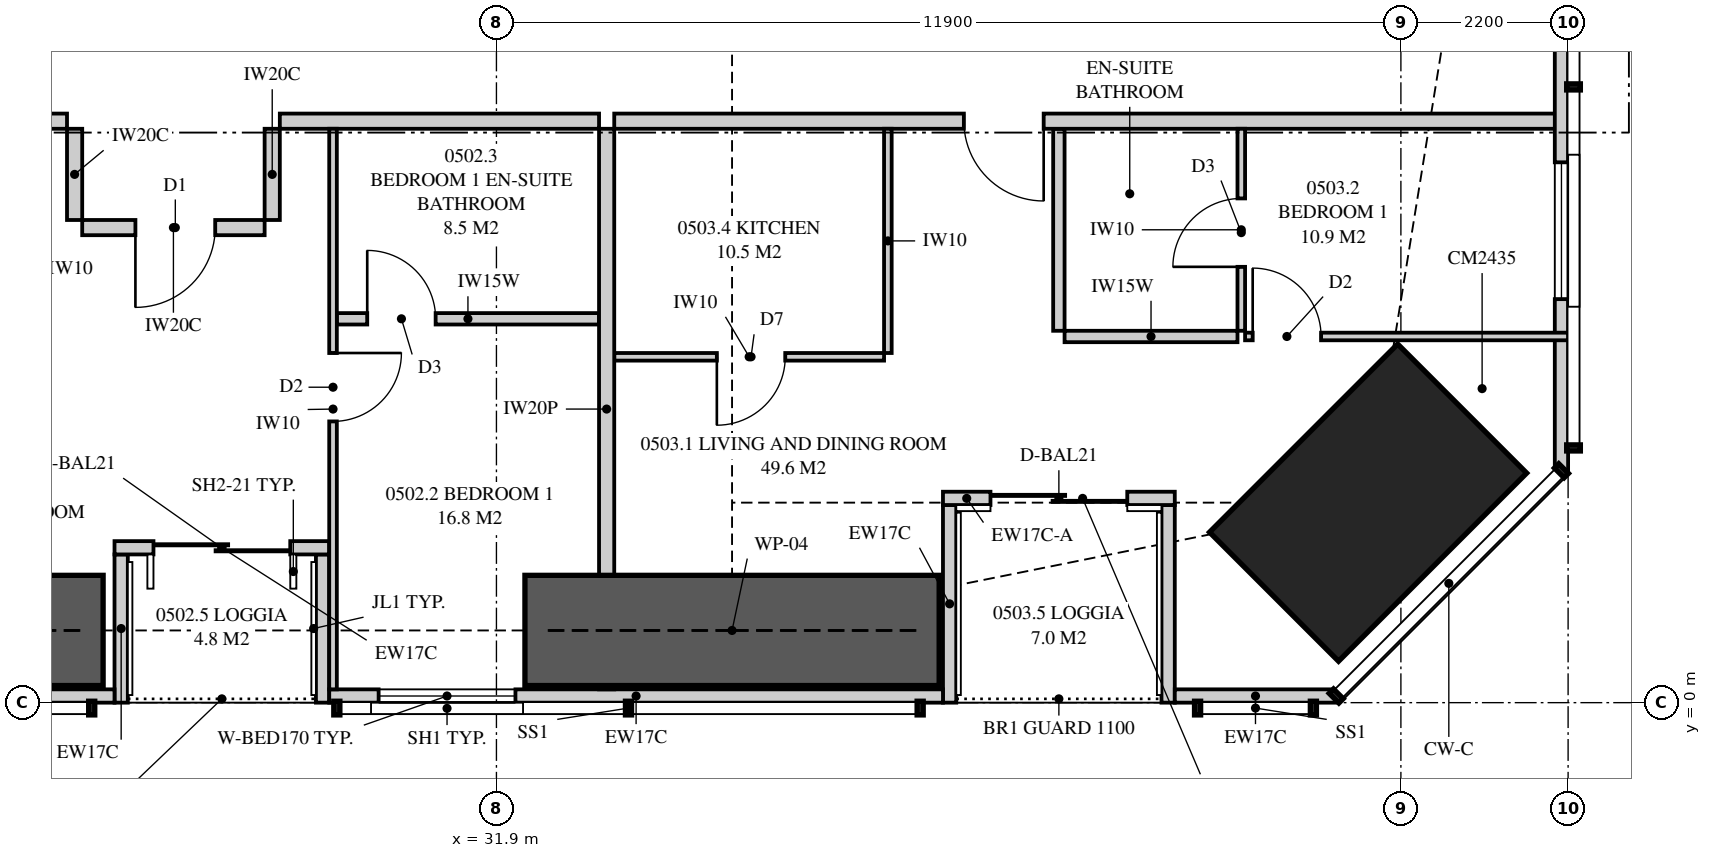
"""IFC4 building model, lengths in metres.
Left out: names, types, materials, properties, quantities, classifications, styles, units other than length and angle.
Written with IfcOpenShell. Run it as: python <this file> out.ifc"""

import sys

from ifc_helpers import new_model, si_unit, direction, frame, frame_2d, origin, origin_2d, place, context, subcontext, project, spatial, polyline, rectangle, outline, extrude, element, fill, save


model = new_model("IFC4")
c1 = context("Model", 3, precision=1e-05, world=origin(), true_north=direction((0.0, 1.0)))
c2 = subcontext(c1, "Body", "Model", "MODEL_VIEW")
j1 = project(units=[si_unit("LENGTHUNIT", "METRE"), si_unit("PLANEANGLEUNIT", "RADIAN")], contexts=[c1])
p1 = place(None, origin())
s1 = spatial("IfcSite", under=j1, at=p1, CompositionType="ELEMENT")
p2 = place(p1, origin())
s2 = spatial("IfcBuilding", under=s1, at=p2, CompositionType="ELEMENT")
p3 = place(p2, frame((0.0, 0.0, 24.35)))
s3 = spatial("IfcBuildingStorey", under=s2, at=p3, CompositionType="ELEMENT", Elevation=24.35)
p4 = place(p3, frame((43.369, 2.631, 0.0), z_axis=(0.0, 0.0, 1.0), x_axis=(-0.707106781187, 0.707106781187, 0.0)))
e1 = element("IfcColumn", 1, at=p4, inside=s3, PredefinedType="COLUMN", context=c2, shape_type="SweptSolid", body=[
    extrude(rectangle(XDim=2.4, YDim=3.5, at=origin_2d()), origin(), (0.0, 0.0, 1.0), 3.35),
])
p5 = place(p3, frame((19.025, 0.087, 0.0), z_axis=(0.0, 0.0, 1.0), x_axis=(1.0, 0.0, 0.0)))
e2 = element("IfcWall", 2, at=p5, inside=s3, PredefinedType="SOLIDWALL", context=c2, shape_type="SweptSolid", body=[
    extrude(rectangle(XDim=7.85, YDim=0.175, at=frame_2d((3.925, 0.0))), origin(), (0.0, 0.0, 1.0), 2.15),
])
p6 = place(p3, frame((29.7, 0.087, 0.0), z_axis=(0.0, 0.0, 1.0), x_axis=(1.0, 0.0, 0.0)))
e3 = element("IfcWall", 3, at=p6, inside=s3, PredefinedType="SOLIDWALL", context=c2, shape_type="SweptSolid", body=[
    extrude(outline(polyline([(0.0, 0.0), (8.075, 0.0), (8.075, 3.11), (5.504, 3.11), (5.504, 2.15), (5.456, 2.15), (5.456, 3.11), (5.3, 3.11), (5.3, 2.15), (0.0, 2.15), (0.0, 0.0)])), frame((0.0, 0.087, 0.0), z_axis=(0.0, -1.0, 0.0), x_axis=(1.0, 0.0, 0.0)), (0.0, 0.0, 1.0), 0.175),
])
p7 = place(p6, frame((0.65, 0.0, 0.4)))
e4 = element("IfcOpeningElement", 4, at=p7, cuts=e3, PredefinedType="OPENING", context=c2, shape_type="SweptSolid", body=[
    extrude(rectangle(XDim=1.8, YDim=1.7, at=frame_2d((0.9, 0.85))), frame((0.0, 0.097, 0.0), z_axis=(0.0, -1.0, 0.0), x_axis=(1.0, 0.0, 0.0)), (0.0, 0.0, 1.0), 0.195),
])
p8 = place(p3, frame((40.825, 0.087, 0.0), z_axis=(0.0, 0.0, 1.0), x_axis=(1.0, 0.0, 0.0)))
e5 = element("IfcWall", 5, at=p8, inside=s3, PredefinedType="SOLIDWALL", context=c2, shape_type="SweptSolid", body=[
    extrude(rectangle(XDim=2.124, YDim=0.175, at=frame_2d((1.062, 0.0))), origin(), (0.0, 0.0, 1.0), 3.11),
])
p9 = place(p3, frame((26.875, 2.038, 0.0), z_axis=(0.0, 0.0, 1.0), x_axis=(1.0, 0.0, 0.0)))
e6 = element("IfcWall", 6, at=p9, inside=s3, PredefinedType="SOLIDWALL", context=c2, shape_type="SweptSolid", body=[
    extrude(rectangle(XDim=2.825, YDim=0.175, at=frame_2d((1.413, 0.0))), origin(), (0.0, 0.0, 1.0), 3.11),
])
p10 = place(p9, frame((0.512, 0.0, 0.0)))
e7 = element("IfcOpeningElement", 7, at=p10, cuts=e6, PredefinedType="OPENING", context=c2, shape_type="SweptSolid", body=[
    extrude(rectangle(XDim=1.8, YDim=2.1, at=frame_2d((0.9, 1.05))), frame((0.0, 0.097, 0.0), z_axis=(0.0, -1.0, 0.0), x_axis=(1.0, 0.0, 0.0)), (0.0, 0.0, 1.0), 0.195),
])
for number, where, z_axis, x_axis in (
    (8, (26.962, 0.0, 0.0), (0.0, 0.0, 1.0), (0.0, 1.0, 0.0)),
    (9, (29.613, 0.0, 0.0), (0.0, 0.0, 1.0), (0.0, 1.0, 0.0)),
):
    element("IfcWall", number, at=place(p3, frame(where, z_axis=z_axis, x_axis=x_axis)), inside=s3, PredefinedType="SOLIDWALL", context=c2, shape_type="SweptSolid", body=[
        extrude(outline(polyline([(0.0, 0.0), (1.95, 0.0), (1.95, 3.11), (1.75, 3.11), (1.75, 2.15), (0.15, 2.15), (0.15, 3.11), (0.0, 3.11), (0.0, 0.0)])), frame((0.0, 0.087, 0.0), z_axis=(0.0, -1.0, 0.0), x_axis=(1.0, 0.0, 0.0)), (0.0, 0.0, 1.0), 0.175),
    ])
p11 = place(p3, frame((37.775, 2.688, 0.0), z_axis=(0.0, 0.0, 1.0), x_axis=(1.0, 0.0, 0.0)))
e10 = element("IfcWall", 10, at=p11, inside=s3, PredefinedType="SOLIDWALL", context=c2, shape_type="SweptSolid", body=[
    extrude(rectangle(XDim=0.625, YDim=0.175, at=frame_2d((0.312, 0.0))), origin(), (0.0, 0.0, 1.0), 2.51),
])
p12 = place(p3, frame((38.4, 2.688, 0.0), z_axis=(0.0, 0.0, 1.0), x_axis=(1.0, 0.0, 0.0)))
e11 = element("IfcWall", 11, at=p12, inside=s3, PredefinedType="SOLIDWALL", context=c2, shape_type="SweptSolid", body=[
    extrude(rectangle(XDim=2.425, YDim=0.175, at=frame_2d((1.212, 0.0))), origin(), (0.0, 0.0, 1.0), 2.15),
])
p13 = place(p12, origin())
e12 = element("IfcOpeningElement", 12, at=p13, cuts=e11, PredefinedType="OPENING", context=c2, shape_type="SweptSolid", body=[
    extrude(rectangle(XDim=1.8, YDim=2.1, at=frame_2d((0.9, 1.05))), frame((0.0, 0.097, 0.0), z_axis=(0.0, -1.0, 0.0), x_axis=(1.0, 0.0, 0.0)), (0.0, 0.0, 1.0), 0.195),
])
p14 = place(p3, frame((37.863, 0.0, 0.0), z_axis=(0.0, 0.0, 1.0), x_axis=(0.0, 1.0, 0.0)))
e13 = element("IfcWall", 13, at=p14, inside=s3, PredefinedType="SOLIDWALL", context=c2, shape_type="SweptSolid", body=[
    extrude(outline(polyline([(0.0, 0.0), (2.6, 0.0), (2.6, 2.51), (2.359, 2.51), (2.359, 2.15), (0.692, 2.15), (0.692, 3.11), (0.0, 3.11), (0.0, 0.0)])), frame((0.0, 0.087, 0.0), z_axis=(0.0, -1.0, 0.0), x_axis=(1.0, 0.0, 0.0)), (0.0, 0.0, 1.0), 0.175),
])
p15 = place(p3, frame((40.738, 0.0, 0.0), z_axis=(0.0, 0.0, 1.0), x_axis=(0.0, 1.0, 0.0)))
e14 = element("IfcWall", 14, at=p15, inside=s3, PredefinedType="SOLIDWALL", context=c2, shape_type="SweptSolid", body=[
    extrude(outline(polyline([(0.0, 0.0), (2.6, 0.0), (2.6, 2.15), (1.269, 2.15), (1.269, 3.11), (0.0, 3.11), (0.0, 0.0)])), frame((0.0, 0.087, 0.0), z_axis=(0.0, -1.0, 0.0), x_axis=(1.0, 0.0, 0.0)), (0.0, 0.0, 1.0), 0.175),
])
p16 = place(p3, frame((45.913, 3.051, 0.0), z_axis=(0.0, 0.0, 1.0), x_axis=(0.0, 1.0, 0.0)))
e15 = element("IfcWall", 15, at=p16, inside=s3, PredefinedType="SOLIDWALL", context=c2, shape_type="SweptSolid", body=[
    extrude(outline(polyline([(0.0, 0.0), (31.897, 0.0), (31.897, 3.11), (22.167, 3.11), (22.167, 2.15), (22.074, 2.15), (22.074, 3.11), (21.949, 3.11), (21.949, 2.15), (9.949, 2.15), (9.949, 3.11), (9.823, 3.11), (9.823, 2.15), (9.73, 2.15), (9.73, 3.11), (0.0, 3.11), (0.0, 0.0)])), frame((0.0, 0.087, 0.0), z_axis=(0.0, -1.0, 0.0), x_axis=(1.0, 0.0, 0.0)), (0.0, 0.0, 1.0), 0.175),
])
p17 = place(p16, frame((2.257, 0.0, 0.4)))
e16 = element("IfcOpeningElement", 16, at=p17, cuts=e15, PredefinedType="OPENING", context=c2, shape_type="SweptSolid", body=[
    extrude(rectangle(XDim=1.8, YDim=1.7, at=frame_2d((0.9, 0.85))), frame((0.0, 0.097, 0.0), z_axis=(0.0, -1.0, 0.0), x_axis=(1.0, 0.0, 0.0)), (0.0, 0.0, 1.0), 0.195),
])
p18 = place(p16, frame((14.849, 0.0, 0.4)))
e17 = element("IfcOpeningElement", 17, at=p18, cuts=e15, PredefinedType="OPENING", context=c2, shape_type="SweptSolid", body=[
    extrude(rectangle(XDim=1.2, YDim=1.7, at=frame_2d((0.6, 0.85))), frame((0.0, 0.097, 0.0), z_axis=(0.0, -1.0, 0.0), x_axis=(1.0, 0.0, 0.0)), (0.0, 0.0, 1.0), 0.195),
])
p19 = place(p16, frame((27.34, 0.0, 0.4)))
e18 = element("IfcOpeningElement", 18, at=p19, cuts=e15, PredefinedType="OPENING", context=c2, shape_type="SweptSolid", body=[
    extrude(rectangle(XDim=1.8, YDim=1.7, at=frame_2d((0.9, 0.85))), frame((0.0, 0.097, 0.0), z_axis=(0.0, -1.0, 0.0), x_axis=(1.0, 0.0, 0.0)), (0.0, 0.0, 1.0), 0.195),
])
p20 = place(p3, frame((33.35, 0.175, 0.0), z_axis=(0.0, 0.0, 1.0), x_axis=(0.0, 1.0, 0.0)))
e19 = element("IfcWall", 19, at=p20, inside=s3, PredefinedType="PARTITIONING", context=c2, shape_type="SweptSolid", body=[
    extrude(outline(polyline([(0.529, 2.15), (0.0, 2.15), (0.0, 0.0), (0.529, 0.0), (0.529, 0.366), (1.021, 0.366), (1.021, 0.0), (7.375, 0.0), (7.375, 3.11), (1.685, 3.11), (1.685, 2.15), (1.021, 2.15), (1.021, 1.784), (0.529, 1.784), (0.529, 2.15)])), frame((0.0, 0.1, 0.0), z_axis=(0.0, -1.0, 0.0), x_axis=(1.0, 0.0, 0.0)), (0.0, 0.0, 1.0), 0.2),
])
p21 = place(p3, frame((22.05, 7.65, 0.0), z_axis=(0.0, 0.0, 1.0), x_axis=(1.0, 0.0, 0.0)))
e20 = element("IfcWall", 20, at=p21, inside=s3, PredefinedType="PARTITIONING", context=c2, shape_type="SweptSolid", body=[
    extrude(outline(polyline([(0.0, 0.0), (4.2, 0.0), (4.2, 3.11), (2.287, 3.11), (2.287, 2.541), (1.613, 2.541), (1.613, 3.11), (0.0, 3.11), (0.0, 0.0)])), frame((0.0, 0.1, 0.0), z_axis=(0.0, -1.0, 0.0), x_axis=(1.0, 0.0, 0.0)), (0.0, 0.0, 1.0), 0.2),
])
p22 = place(p3, frame((29.75, 0.175, 0.0), z_axis=(0.0, 0.0, 1.0), x_axis=(0.0, 1.0, 0.0)))
e21 = element("IfcWall", 21, at=p22, inside=s3, PredefinedType="PARTITIONING", context=c2, shape_type="SweptSolid", body=[
    extrude(outline(polyline([(0.0, 0.0), (7.375, 0.0), (7.375, 3.11), (1.635, 3.11), (1.635, 2.15), (0.0, 2.15), (0.0, 3.11), (0.0, 0.0)])), frame((0.0, 0.05, 0.0), z_axis=(0.0, -1.0, 0.0), x_axis=(1.0, 0.0, 0.0)), (0.0, 0.0, 1.0), 0.1),
])
p23 = place(p22, frame((3.525, 0.0, 0.0)))
e22 = element("IfcOpeningElement", 22, at=p23, cuts=e21, PredefinedType="OPENING", context=c2, shape_type="SweptSolid", body=[
    extrude(rectangle(XDim=0.9, YDim=2.1, at=frame_2d((0.45, 1.05))), frame((0.0, 0.06, 0.0), z_axis=(0.0, -1.0, 0.0), x_axis=(1.0, 0.0, 0.0)), (0.0, 0.0, 1.0), 0.12),
])
p24 = place(p3, frame((29.8, 5.05, 0.0), z_axis=(0.0, 0.0, 1.0), x_axis=(1.0, 0.0, 0.0)))
e23 = element("IfcWall", 23, at=p24, inside=s3, PredefinedType="PLUMBINGWALL", context=c2, shape_type="SweptSolid", body=[
    extrude(rectangle(XDim=3.45, YDim=0.15, at=frame_2d((1.725, 0.0))), origin(), (0.0, 0.0, 1.0), 3.11),
])
p25 = place(p24, frame((0.4, 0.0, 0.0)))
e24 = element("IfcOpeningElement", 24, at=p25, cuts=e23, PredefinedType="OPENING", context=c2, shape_type="SweptSolid", body=[
    extrude(rectangle(XDim=0.9, YDim=2.1, at=frame_2d((0.45, 1.05))), frame((0.0, 0.085, 0.0), z_axis=(0.0, -1.0, 0.0), x_axis=(1.0, 0.0, 0.0)), (0.0, 0.0, 1.0), 0.17),
])
p26 = place(p3, frame((33.45, 7.65, 0.0), z_axis=(0.0, 0.0, 1.0), x_axis=(1.0, 0.0, 0.0)))
e25 = element("IfcWall", 25, at=p26, inside=s3, PredefinedType="PARTITIONING", context=c2, shape_type="SweptSolid", body=[
    extrude(outline(polyline([(0.0, 0.0), (12.55, 0.0), (12.55, 3.11), (11.654, 3.11), (11.654, 2.15), (9.811, 2.15), (9.811, 3.11), (1.887, 3.11), (1.887, 2.541), (1.213, 2.541), (1.213, 3.11), (0.0, 3.11), (0.0, 0.0)])), frame((0.0, 0.1, 0.0), z_axis=(0.0, -1.0, 0.0), x_axis=(1.0, 0.0, 0.0)), (0.0, 0.0, 1.0), 0.2),
])
p27 = place(p26, frame((4.6, 0.0, 0.0)))
e26 = element("IfcOpeningElement", 26, at=p27, cuts=e25, PredefinedType="OPENING", context=c2, shape_type="SweptSolid", body=[
    extrude(rectangle(XDim=1.05, YDim=2.2, at=frame_2d((0.525, 1.1))), frame((0.0, 0.11, 0.0), z_axis=(0.0, -1.0, 0.0), x_axis=(1.0, 0.0, 0.0)), (0.0, 0.0, 1.0), 0.22),
])
p28 = place(p3, frame((41.7, 4.892, 0.0), z_axis=(0.0, 0.0, 1.0), x_axis=(0.0, 1.0, 0.0)))
e27 = element("IfcWall", 27, at=p28, inside=s3, PredefinedType="PARTITIONING", context=c2, shape_type="SweptSolid", body=[
    extrude(rectangle(XDim=2.658, YDim=0.1, at=frame_2d((1.329, 0.0))), origin(), (0.0, 0.0, 1.0), 3.11),
])
p29 = place(p28, frame((0.841, 0.0, 0.0)))
e28 = element("IfcOpeningElement", 28, at=p29, cuts=e27, PredefinedType="OPENING", context=c2, shape_type="SweptSolid", body=[
    extrude(rectangle(XDim=0.9, YDim=2.1, at=frame_2d((0.45, 1.05))), frame((0.0, 0.06, 0.0), z_axis=(0.0, -1.0, 0.0), x_axis=(1.0, 0.0, 0.0)), (0.0, 0.0, 1.0), 0.12),
])
p30 = place(p3, frame((41.75, 4.817, 0.0), z_axis=(0.0, 0.0, 1.0), x_axis=(1.0, 0.0, 0.0)))
e29 = element("IfcWall", 29, at=p30, inside=s3, PredefinedType="PARTITIONING", context=c2, shape_type="SweptSolid", body=[
    extrude(outline(polyline([(0.0, 0.0), (4.25, 0.0), (4.25, 3.11), (2.844, 3.11), (2.844, 2.15), (1.102, 2.15), (1.102, 3.11), (0.0, 3.11), (0.0, 0.0)])), frame((0.0, 0.05, 0.0), z_axis=(0.0, -1.0, 0.0), x_axis=(1.0, 0.0, 0.0)), (0.0, 0.0, 1.0), 0.1),
])
p31 = place(p30, frame((0.1, 0.0, 0.0)))
e30 = element("IfcOpeningElement", 30, at=p31, cuts=e29, PredefinedType="OPENING", context=c2, shape_type="SweptSolid", body=[
    extrude(rectangle(XDim=0.9, YDim=2.1, at=frame_2d((0.45, 1.05))), frame((0.0, 0.06, 0.0), z_axis=(0.0, -1.0, 0.0), x_axis=(1.0, 0.0, 0.0)), (0.0, 0.0, 1.0), 0.12),
])
p32 = place(p3, frame((39.375, 4.817, 0.0), z_axis=(0.0, 0.0, 1.0), x_axis=(1.0, 0.0, 0.0)))
e31 = element("IfcWall", 31, at=p32, inside=s3, PredefinedType="PLUMBINGWALL", context=c2, shape_type="SweptSolid", body=[
    extrude(rectangle(XDim=2.275, YDim=0.15, at=frame_2d((1.137, 0.0))), origin(), (0.0, 0.0, 1.0), 3.11),
])
p33 = place(p3, frame((39.3, 4.892, 0.0), z_axis=(0.0, 0.0, 1.0), x_axis=(0.0, 1.0, 0.0)))
e32 = element("IfcWall", 32, at=p33, inside=s3, PredefinedType="PLUMBINGWALL", context=c2, shape_type="SweptSolid", body=[
    extrude(rectangle(XDim=2.658, YDim=0.15, at=frame_2d((1.329, 0.0))), origin(), (0.0, 0.0, 1.0), 3.11),
])
p34 = place(p3, frame((33.45, 4.55, 0.0), z_axis=(0.0, 0.0, 1.0), x_axis=(1.0, 0.0, 0.0)))
e33 = element("IfcWall", 33, at=p34, inside=s3, PredefinedType="PARTITIONING", context=c2, shape_type="SweptSolid", body=[
    extrude(outline(polyline([(0.0, 0.0), (3.55, 0.0), (3.55, 3.11), (1.837, 3.11), (1.837, 2.541), (1.263, 2.541), (1.263, 3.11), (0.0, 3.11), (0.0, 0.0)])), frame((0.0, 0.05, 0.0), z_axis=(0.0, -1.0, 0.0), x_axis=(1.0, 0.0, 0.0)), (0.0, 0.0, 1.0), 0.1),
])
p35 = place(p34, frame((1.35, 0.0, 0.0)))
e34 = element("IfcOpeningElement", 34, at=p35, cuts=e33, PredefinedType="OPENING", context=c2, shape_type="SweptSolid", body=[
    extrude(rectangle(XDim=0.9, YDim=2.1, at=frame_2d((0.45, 1.05))), frame((0.0, 0.06, 0.0), z_axis=(0.0, -1.0, 0.0), x_axis=(1.0, 0.0, 0.0)), (0.0, 0.0, 1.0), 0.12),
])
p36 = place(p3, frame((37.05, 4.6, 0.0), z_axis=(0.0, 0.0, 1.0), x_axis=(0.0, 1.0, 0.0)))
e35 = element("IfcWall", 35, at=p36, inside=s3, PredefinedType="PARTITIONING", context=c2, shape_type="SweptSolid", body=[
    extrude(rectangle(XDim=2.95, YDim=0.1, at=frame_2d((1.475, 0.0))), origin(), (0.0, 0.0, 1.0), 3.11),
])
p37 = place(p3, frame((29.05, 7.65, 0.0), z_axis=(0.0, 0.0, 1.0), x_axis=(1.0, 0.0, 0.0)))
e36 = element("IfcWall", 36, at=p37, inside=s3, PredefinedType="PARTITIONING", context=c2, shape_type="SweptSolid", body=[
    extrude(rectangle(XDim=4.2, YDim=0.2, at=frame_2d((2.1, 0.0))), origin(), (0.0, 0.0, 1.0), 3.11),
])
p38 = place(p3, frame((26.45, 6.25, 0.0), z_axis=(0.0, 0.0, 1.0), x_axis=(1.0, 0.0, 0.0)))
e37 = element("IfcWall", 37, at=p38, inside=s3, PredefinedType="PARTITIONING", context=c2, shape_type="SweptSolid", body=[
    extrude(rectangle(XDim=2.4, YDim=0.2, at=frame_2d((1.2, 0.0))), origin(), (0.0, 0.0, 1.0), 3.11),
])
p39 = place(p38, frame((0.7, 0.0, 0.0)))
e38 = element("IfcOpeningElement", 38, at=p39, cuts=e37, PredefinedType="OPENING", context=c2, shape_type="SweptSolid", body=[
    extrude(rectangle(XDim=1.05, YDim=2.2, at=frame_2d((0.525, 1.1))), frame((0.0, 0.11, 0.0), z_axis=(0.0, -1.0, 0.0), x_axis=(1.0, 0.0, 0.0)), (0.0, 0.0, 1.0), 0.22),
])
for number, where, z_axis, x_axis in (
    (39, (26.35, 7.55, 0.0), (0.0, 0.0, 1.0), (0.0, -1.0, 0.0)),
    (40, (28.95, 7.55, 0.0), (0.0, 0.0, 1.0), (0.0, -1.0, 0.0)),
):
    element("IfcWall", number, at=place(p3, frame(where, z_axis=z_axis, x_axis=x_axis)), inside=s3, PredefinedType="PARTITIONING", context=c2, shape_type="SweptSolid", body=[
        extrude(rectangle(XDim=1.2, YDim=0.2, at=frame_2d((0.6, 0.0))), origin(), (0.0, 0.0, 1.0), 3.11),
    ])
for number, where, z_axis, x_axis in (
    (41, (21.275, 0.95, 0.0), (0.0, 0.0, 1.0), (1.0, 0.0, 0.0)),
    (42, (32.275, 0.95, 0.0), (0.0, 0.0, 1.0), (1.0, 0.0, 0.0)),
):
    element("IfcWall", number, at=place(p3, frame(where, z_axis=z_axis, x_axis=x_axis)), inside=s3, PredefinedType="SHEAR", context=c2, shape_type="SweptSolid", body=[
        extrude(rectangle(XDim=5.45, YDim=1.45, at=frame_2d((2.725, 0.0))), origin(), (0.0, 0.0, 1.0), 3.35),
    ])
p40 = place(p10, origin())
e43 = element("IfcDoor", 43, at=p40, inside=s3, OperationType="SLIDING_TO_LEFT", PredefinedType="DOOR", context=c2, shape_type="SweptSolid", body=[
    extrude(rectangle(XDim=1.8, YDim=2.1, at=frame_2d((0.9, 1.05))), frame((0.0, 0.025, 0.0), z_axis=(0.0, -1.0, 0.0), x_axis=(1.0, 0.0, 0.0)), (0.0, 0.0, 1.0), 0.05),
])
fill(e7, e43)
p41 = place(p7, origin())
e44 = element("IfcWindow", 44, at=p41, inside=s3, PartitioningType="SINGLE_PANEL", PredefinedType="WINDOW", context=c2, shape_type="SweptSolid", body=[
    extrude(rectangle(XDim=1.8, YDim=1.7, at=frame_2d((0.9, 0.85))), frame((0.0, 0.03, 0.0), z_axis=(0.0, -1.0, 0.0), x_axis=(1.0, 0.0, 0.0)), (0.0, 0.0, 1.0), 0.06),
])
fill(e4, e44)
p42 = place(p13, origin())
e45 = element("IfcDoor", 45, at=p42, inside=s3, OperationType="SLIDING_TO_LEFT", PredefinedType="DOOR", context=c2, shape_type="SweptSolid", body=[
    extrude(rectangle(XDim=1.8, YDim=2.1, at=frame_2d((0.9, 1.05))), frame((0.0, 0.025, 0.0), z_axis=(0.0, -1.0, 0.0), x_axis=(1.0, 0.0, 0.0)), (0.0, 0.0, 1.0), 0.05),
])
fill(e12, e45)
p43 = place(p17, origin())
e46 = element("IfcWindow", 46, at=p43, inside=s3, PartitioningType="SINGLE_PANEL", PredefinedType="WINDOW", context=c2, shape_type="SweptSolid", body=[
    extrude(rectangle(XDim=1.8, YDim=1.7, at=frame_2d((0.9, 0.85))), frame((0.0, 0.03, 0.0), z_axis=(0.0, -1.0, 0.0), x_axis=(1.0, 0.0, 0.0)), (0.0, 0.0, 1.0), 0.06),
])
fill(e16, e46)
p44 = place(p39, frame((1.05, 0.0, 0.0), z_axis=(0.0, 0.0, 1.0), x_axis=(-1.0, 0.0, 0.0)))
e47 = element("IfcDoor", 47, at=p44, inside=s3, OperationType="SINGLE_SWING_RIGHT", PredefinedType="DOOR", context=c2, shape_type="SweptSolid", body=[
    extrude(rectangle(XDim=1.05, YDim=2.2, at=frame_2d((0.525, 1.1))), frame((0.0, 0.025, 0.0), z_axis=(0.0, -1.0, 0.0), x_axis=(1.0, 0.0, 0.0)), (0.0, 0.0, 1.0), 0.05),
])
fill(e38, e47)
p45 = place(p23, frame((0.9, 0.0, 0.0), z_axis=(0.0, 0.0, 1.0), x_axis=(-1.0, 0.0, 0.0)))
e48 = element("IfcDoor", 48, at=p45, inside=s3, OperationType="SINGLE_SWING_LEFT", PredefinedType="DOOR", context=c2, shape_type="SweptSolid", body=[
    extrude(rectangle(XDim=0.9, YDim=2.1, at=frame_2d((0.45, 1.05))), frame((0.0, 0.025, 0.0), z_axis=(0.0, -1.0, 0.0), x_axis=(1.0, 0.0, 0.0)), (0.0, 0.0, 1.0), 0.05),
])
fill(e22, e48)
p46 = place(p25, origin())
e49 = element("IfcDoor", 49, at=p46, inside=s3, OperationType="SINGLE_SWING_LEFT", PredefinedType="DOOR", context=c2, shape_type="SweptSolid", body=[
    extrude(rectangle(XDim=0.9, YDim=2.1, at=frame_2d((0.45, 1.05))), frame((0.0, 0.025, 0.0), z_axis=(0.0, -1.0, 0.0), x_axis=(1.0, 0.0, 0.0)), (0.0, 0.0, 1.0), 0.05),
])
fill(e24, e49)
p47 = place(p27, frame((1.05, 0.0, 0.0), z_axis=(0.0, 0.0, 1.0), x_axis=(-1.0, 0.0, 0.0)))
e50 = element("IfcDoor", 50, at=p47, inside=s3, OperationType="SINGLE_SWING_LEFT", PredefinedType="DOOR", context=c2, shape_type="SweptSolid", body=[
    extrude(rectangle(XDim=1.05, YDim=2.2, at=frame_2d((0.525, 1.1))), frame((0.0, 0.025, 0.0), z_axis=(0.0, -1.0, 0.0), x_axis=(1.0, 0.0, 0.0)), (0.0, 0.0, 1.0), 0.05),
])
fill(e26, e50)
p48 = place(p31, origin())
e51 = element("IfcDoor", 51, at=p48, inside=s3, OperationType="SINGLE_SWING_LEFT", PredefinedType="DOOR", context=c2, shape_type="SweptSolid", body=[
    extrude(rectangle(XDim=0.9, YDim=2.1, at=frame_2d((0.45, 1.05))), frame((0.0, 0.025, 0.0), z_axis=(0.0, -1.0, 0.0), x_axis=(1.0, 0.0, 0.0)), (0.0, 0.0, 1.0), 0.05),
])
fill(e30, e51)
p49 = place(p29, origin())
e52 = element("IfcDoor", 52, at=p49, inside=s3, OperationType="SINGLE_SWING_LEFT", PredefinedType="DOOR", context=c2, shape_type="SweptSolid", body=[
    extrude(rectangle(XDim=0.9, YDim=2.1, at=frame_2d((0.45, 1.05))), frame((0.0, 0.025, 0.0), z_axis=(0.0, -1.0, 0.0), x_axis=(1.0, 0.0, 0.0)), (0.0, 0.0, 1.0), 0.05),
])
fill(e28, e52)
p50 = place(p35, frame((0.9, 0.0, 0.0), z_axis=(0.0, 0.0, 1.0), x_axis=(-1.0, 0.0, 0.0)))
e53 = element("IfcDoor", 53, at=p50, inside=s3, OperationType="SINGLE_SWING_RIGHT", PredefinedType="DOOR", context=c2, shape_type="SweptSolid", body=[
    extrude(rectangle(XDim=0.9, YDim=2.1, at=frame_2d((0.45, 1.05))), frame((0.0, 0.025, 0.0), z_axis=(0.0, -1.0, 0.0), x_axis=(1.0, 0.0, 0.0)), (0.0, 0.0, 1.0), 0.05),
])
fill(e34, e53)
save(model, sys.argv[1])
